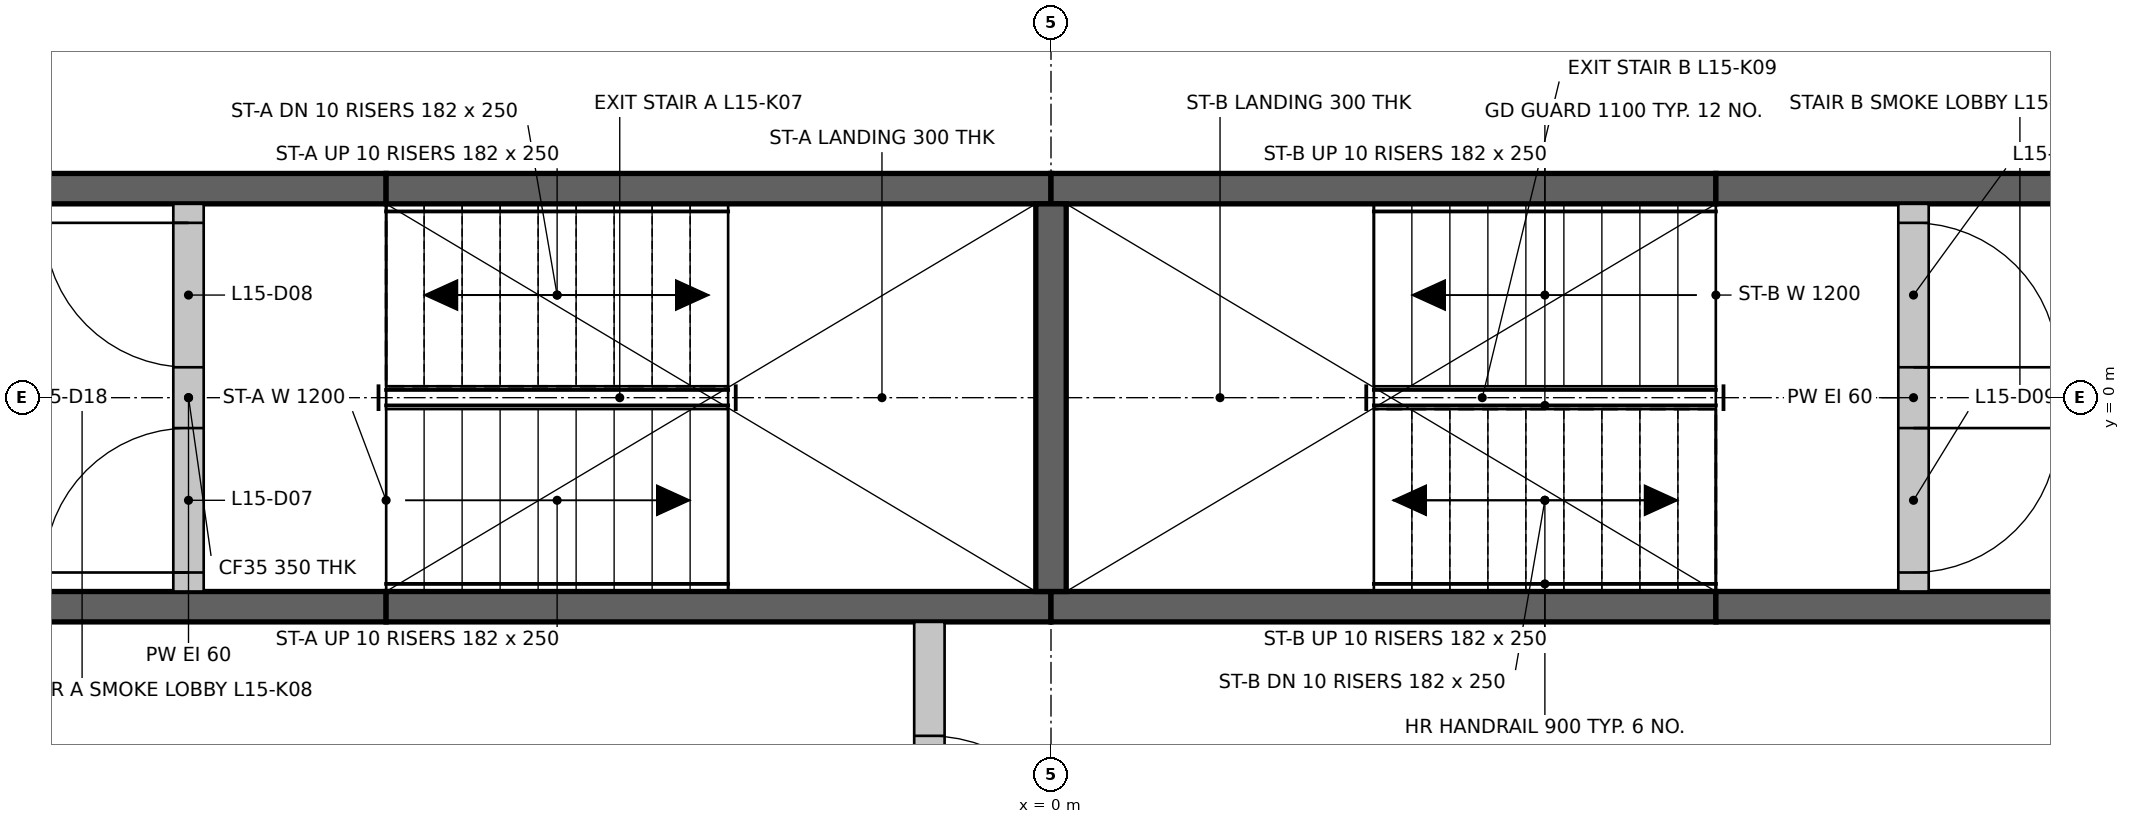
"""IFC4 building model, lengths in metres.
Left out: names, types, materials, properties, quantities, classifications, styles, units other than length and angle.
Written with IfcOpenShell. Run it as: python <this file> out.ifc"""

import sys

from ifc_helpers import new_model, si_unit, direction, frame, frame_2d, origin, place, context, subcontext, project, spatial, rectangle, extrude, element, fill, save


model = new_model("IFC4")
c1 = context("Model", 3, precision=1e-05, world=origin(), true_north=direction((0.0, 1.0)))
c2 = subcontext(c1, "Body", "Model", "MODEL_VIEW")
j1 = project(units=[si_unit("LENGTHUNIT", "METRE"), si_unit("PLANEANGLEUNIT", "RADIAN")], contexts=[c1])
p1 = place(None, origin())
s1 = spatial("IfcSite", under=j1, at=p1, CompositionType="ELEMENT")
p2 = place(p1, origin())
s2 = spatial("IfcBuilding", under=s1, at=p2, CompositionType="ELEMENT")
p3 = place(p2, frame((0.0, 0.0, 62.7)))
s3 = spatial("IfcBuildingStorey", under=s2, at=p3, CompositionType="ELEMENT", Elevation=62.7)
p4 = place(p3, frame((-6.974, -1.375, 0.0), z_axis=(0.0, 0.0, 1.0), x_axis=(1.0, 0.0, 0.0)))
e1 = element("IfcWall", 1, at=p4, inside=s3, PredefinedType="SHEAR", context=c2, shape_type="SweptSolid", body=[
    extrude(rectangle(XDim=2.6, YDim=0.2, at=frame_2d((1.3, 0.0))), origin(), (0.0, 0.0, 1.0), 3.3),
])
for number, where, z_axis, x_axis in (
    (2, (-4.374, -1.375, 0.0), (0.0, 0.0, 1.0), (1.0, 0.0, 0.0)),
    (3, (0.0, -1.375, 0.0), (0.0, 0.0, 1.0), (1.0, 0.0, 0.0)),
):
    element("IfcWall", number, at=place(p3, frame(where, z_axis=z_axis, x_axis=x_axis)), inside=s3, PredefinedType="SHEAR", context=c2, shape_type="SweptSolid", body=[
        extrude(rectangle(XDim=4.374, YDim=0.2, at=frame_2d((2.187, 0.0))), origin(), (0.0, 0.0, 1.0), 3.3),
    ])
for number, where, z_axis, x_axis in (
    (4, (4.374, -1.375, 0.0), (0.0, 0.0, 1.0), (1.0, 0.0, 0.0)),
    (5, (-6.974, 1.375, 0.0), (0.0, 0.0, 1.0), (1.0, 0.0, 0.0)),
):
    element("IfcWall", number, at=place(p3, frame(where, z_axis=z_axis, x_axis=x_axis)), inside=s3, PredefinedType="SHEAR", context=c2, shape_type="SweptSolid", body=[
        extrude(rectangle(XDim=2.6, YDim=0.2, at=frame_2d((1.3, 0.0))), origin(), (0.0, 0.0, 1.0), 3.3),
    ])
for number, where, z_axis, x_axis in (
    (6, (-4.374, 1.375, 0.0), (0.0, 0.0, 1.0), (1.0, 0.0, 0.0)),
    (7, (0.0, 1.375, 0.0), (0.0, 0.0, 1.0), (1.0, 0.0, 0.0)),
):
    element("IfcWall", number, at=place(p3, frame(where, z_axis=z_axis, x_axis=x_axis)), inside=s3, PredefinedType="SHEAR", context=c2, shape_type="SweptSolid", body=[
        extrude(rectangle(XDim=4.374, YDim=0.2, at=frame_2d((2.187, 0.0))), origin(), (0.0, 0.0, 1.0), 3.3),
    ])
p5 = place(p3, frame((4.374, 1.375, 0.0), z_axis=(0.0, 0.0, 1.0), x_axis=(1.0, 0.0, 0.0)))
e8 = element("IfcWall", 8, at=p5, inside=s3, PredefinedType="SHEAR", context=c2, shape_type="SweptSolid", body=[
    extrude(rectangle(XDim=2.6, YDim=0.2, at=frame_2d((1.3, 0.0))), origin(), (0.0, 0.0, 1.0), 3.3),
])
p6 = place(p3, frame((0.0, -1.275, 0.0), z_axis=(0.0, 0.0, 1.0), x_axis=(0.0, 1.0, 0.0)))
e9 = element("IfcWall", 9, at=p6, inside=s3, PredefinedType="SHEAR", context=c2, shape_type="SweptSolid", body=[
    extrude(rectangle(XDim=2.55, YDim=0.2, at=frame_2d((1.275, 0.0))), origin(), (0.0, 0.0, 1.0), 3.3),
])
p7 = place(p3, frame((-0.8, -3.974, 0.0), z_axis=(0.0, 0.0, 1.0), x_axis=(0.0, 1.0, 0.0)))
e10 = element("IfcWall", 10, at=p7, inside=s3, PredefinedType="PARTITIONING", context=c2, shape_type="SweptSolid", body=[
    extrude(rectangle(XDim=2.499, YDim=0.2, at=frame_2d((1.25, 0.0))), origin(), (0.0, 0.0, 1.0), 3.3),
])
p8 = place(p7, frame((0.75, 0.0, 0.0)))
e11 = element("IfcOpeningElement", 11, at=p8, cuts=e10, PredefinedType="OPENING", context=c2, shape_type="SweptSolid", body=[
    extrude(rectangle(XDim=1.0, YDim=2.1, at=frame_2d((0.5, 1.05))), frame((0.0, 0.11, 0.0), z_axis=(0.0, -1.0, 0.0), x_axis=(1.0, 0.0, 0.0)), (0.0, 0.0, 1.0), 0.22),
])
p9 = place(p3, frame((-5.674, -1.275, 0.0), z_axis=(0.0, 0.0, 1.0), x_axis=(0.0, 1.0, 0.0)))
e12 = element("IfcWall", 12, at=p9, inside=s3, PredefinedType="PARTITIONING", context=c2, shape_type="SweptSolid", body=[
    extrude(rectangle(XDim=2.55, YDim=0.2, at=frame_2d((1.275, 0.0))), origin(), (0.0, 0.0, 1.0), 3.3),
])
p10 = place(p9, frame((0.125, 0.0, 0.0)))
e13 = element("IfcOpeningElement", 13, at=p10, cuts=e12, PredefinedType="OPENING", context=c2, shape_type="SweptSolid", body=[
    extrude(rectangle(XDim=0.95, YDim=2.1, at=frame_2d((0.475, 1.05))), frame((0.0, 0.11, 0.0), z_axis=(0.0, -1.0, 0.0), x_axis=(1.0, 0.0, 0.0)), (0.0, 0.0, 1.0), 0.22),
])
p11 = place(p9, frame((1.475, 0.0, 0.0)))
e14 = element("IfcOpeningElement", 14, at=p11, cuts=e12, PredefinedType="OPENING", context=c2, shape_type="SweptSolid", body=[
    extrude(rectangle(XDim=0.95, YDim=2.1, at=frame_2d((0.475, 1.05))), frame((0.0, 0.11, 0.0), z_axis=(0.0, -1.0, 0.0), x_axis=(1.0, 0.0, 0.0)), (0.0, 0.0, 1.0), 0.22),
])
p12 = place(p3, frame((5.674, -1.275, 0.0), z_axis=(0.0, 0.0, 1.0), x_axis=(0.0, 1.0, 0.0)))
e15 = element("IfcWall", 15, at=p12, inside=s3, PredefinedType="PARTITIONING", context=c2, shape_type="SweptSolid", body=[
    extrude(rectangle(XDim=2.55, YDim=0.2, at=frame_2d((1.275, 0.0))), origin(), (0.0, 0.0, 1.0), 3.3),
])
p13 = place(p12, frame((0.125, 0.0, 0.0)))
e16 = element("IfcOpeningElement", 16, at=p13, cuts=e15, PredefinedType="OPENING", context=c2, shape_type="SweptSolid", body=[
    extrude(rectangle(XDim=0.95, YDim=2.1, at=frame_2d((0.475, 1.05))), frame((0.0, 0.11, 0.0), z_axis=(0.0, -1.0, 0.0), x_axis=(1.0, 0.0, 0.0)), (0.0, 0.0, 1.0), 0.22),
])
p14 = place(p12, frame((1.475, 0.0, 0.0)))
e17 = element("IfcOpeningElement", 17, at=p14, cuts=e15, PredefinedType="OPENING", context=c2, shape_type="SweptSolid", body=[
    extrude(rectangle(XDim=0.95, YDim=2.1, at=frame_2d((0.475, 1.05))), frame((0.0, 0.11, 0.0), z_axis=(0.0, -1.0, 0.0), x_axis=(1.0, 0.0, 0.0)), (0.0, 0.0, 1.0), 0.22),
])
p15 = place(p10, origin())
e18 = element("IfcDoor", 18, at=p15, inside=s3, OperationType="SINGLE_SWING_LEFT", PredefinedType="DOOR", context=c2, shape_type="SweptSolid", body=[
    extrude(rectangle(XDim=0.95, YDim=2.1, at=frame_2d((0.475, 1.05))), frame((0.0, 0.025, 0.0), z_axis=(0.0, -1.0, 0.0), x_axis=(1.0, 0.0, 0.0)), (0.0, 0.0, 1.0), 0.05),
])
fill(e13, e18)
p16 = place(p11, origin())
e19 = element("IfcDoor", 19, at=p16, inside=s3, OperationType="SINGLE_SWING_RIGHT", PredefinedType="DOOR", context=c2, shape_type="SweptSolid", body=[
    extrude(rectangle(XDim=0.95, YDim=2.1, at=frame_2d((0.475, 1.05))), frame((0.0, 0.025, 0.0), z_axis=(0.0, -1.0, 0.0), x_axis=(1.0, 0.0, 0.0)), (0.0, 0.0, 1.0), 0.05),
])
fill(e14, e19)
p17 = place(p13, frame((0.95, 0.0, 0.0), z_axis=(0.0, 0.0, 1.0), x_axis=(-1.0, 0.0, 0.0)))
e20 = element("IfcDoor", 20, at=p17, inside=s3, OperationType="SINGLE_SWING_RIGHT", PredefinedType="DOOR", context=c2, shape_type="SweptSolid", body=[
    extrude(rectangle(XDim=0.95, YDim=2.1, at=frame_2d((0.475, 1.05))), frame((0.0, 0.025, 0.0), z_axis=(0.0, -1.0, 0.0), x_axis=(1.0, 0.0, 0.0)), (0.0, 0.0, 1.0), 0.05),
])
fill(e16, e20)
p18 = place(p14, frame((0.95, 0.0, 0.0), z_axis=(0.0, 0.0, 1.0), x_axis=(-1.0, 0.0, 0.0)))
e21 = element("IfcDoor", 21, at=p18, inside=s3, OperationType="SINGLE_SWING_LEFT", PredefinedType="DOOR", context=c2, shape_type="SweptSolid", body=[
    extrude(rectangle(XDim=0.95, YDim=2.1, at=frame_2d((0.475, 1.05))), frame((0.0, 0.025, 0.0), z_axis=(0.0, -1.0, 0.0), x_axis=(1.0, 0.0, 0.0)), (0.0, 0.0, 1.0), 0.05),
])
fill(e17, e21)
p19 = place(p8, frame((1.0, 0.0, 0.0), z_axis=(0.0, 0.0, 1.0), x_axis=(-1.0, 0.0, 0.0)))
e22 = element("IfcDoor", 22, at=p19, inside=s3, OperationType="SINGLE_SWING_LEFT", PredefinedType="DOOR", context=c2, shape_type="SweptSolid", body=[
    extrude(rectangle(XDim=1.0, YDim=2.1, at=frame_2d((0.5, 1.05))), frame((0.0, 0.025, 0.0), z_axis=(0.0, -1.0, 0.0), x_axis=(1.0, 0.0, 0.0)), (0.0, 0.0, 1.0), 0.05),
])
fill(e11, e22)
save(model, sys.argv[1])
